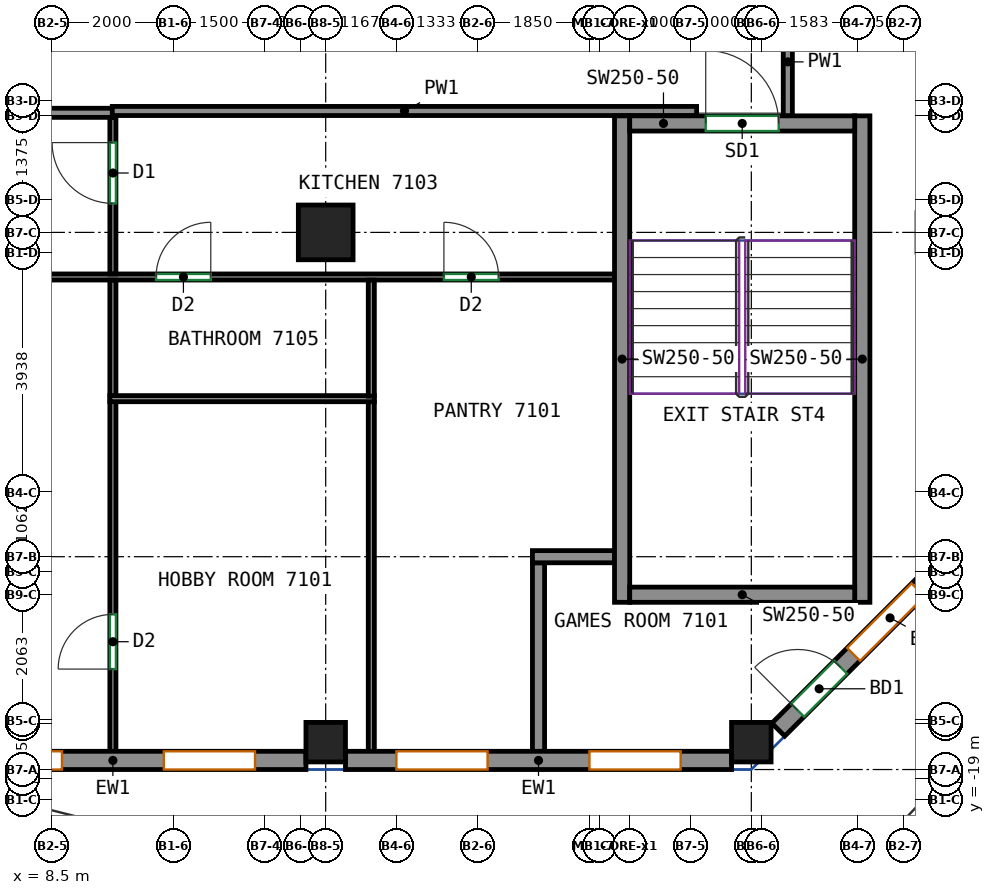
"""IFC4 building model, lengths in metres.
Left out: names, types, materials, properties, quantities, classifications, styles, units other than length and angle.
Written with IfcOpenShell. Run it as: python <this file> out.ifc"""

import sys

from ifc_helpers import new_model, si_unit, direction, frame, frame_2d, origin, origin_2d, place, context, subcontext, project, spatial, rectangle, extrude, source, transform, mapped, element, fill, save


model = new_model("IFC4")
c1 = context("Model", 3, precision=1e-05, world=origin(), true_north=direction((0.0, 1.0)))
c2 = subcontext(c1, "Body", "Model", "MODEL_VIEW")
j1 = project(units=[si_unit("LENGTHUNIT", "METRE"), si_unit("PLANEANGLEUNIT", "RADIAN")], contexts=[c1])
p1 = place(None, origin())
s1 = spatial("IfcSite", under=j1, at=p1, CompositionType="ELEMENT")
p2 = place(p1, origin())
s2 = spatial("IfcBuilding", under=s1, at=p2, CompositionType="ELEMENT")
p3 = place(p2, frame((0.0, 0.0, 287.4)))
s3 = spatial("IfcBuildingStorey", under=s2, at=p3, CompositionType="ELEMENT", Elevation=287.4)
m1 = source(origin(), c2, "Body", "SweptSolid", [
    extrude(rectangle(XDim=0.65, YDim=0.65, at=origin_2d()), origin(), (0.0, 0.0, 1.0), 3.0),
])
p4 = place(p3, frame((13.0, -18.05, 0.0), z_axis=(0.0, 0.0, 1.0), x_axis=(1.0, 0.0, 0.0)))
e1 = element("IfcColumn", 1, at=p4, inside=s3, PredefinedType="COLUMN", context=c2, shape_type="MappedRepresentation", body=[
    mapped(m1, transform((0.0, 0.0, 0.0))),
])
m2 = source(origin(), c2, "Body", "SweptSolid", [
    extrude(rectangle(XDim=0.9, YDim=0.9, at=origin_2d()), origin(), (0.0, 0.0, 1.0), 3.0),
])
p5 = place(p3, frame((13.0, -9.667, 0.0), z_axis=(0.0, 0.0, 1.0), x_axis=(1.0, 0.0, 0.0)))
e2 = element("IfcColumn", 2, at=p5, inside=s3, PredefinedType="COLUMN", context=c2, shape_type="MappedRepresentation", body=[
    mapped(m2, transform((0.0, 0.0, 0.0))),
])
p6 = place(p3, frame((20.0, -18.05, 0.0), z_axis=(0.0, 0.0, 1.0), x_axis=(1.0, 0.0, 0.0)))
e3 = element("IfcColumn", 3, at=p6, inside=s3, PredefinedType="COLUMN", context=c2, shape_type="MappedRepresentation", body=[
    mapped(m1, transform((0.0, 0.0, 0.0))),
])
m3 = source(origin(), c2, "Body", "SweptSolid", [
    extrude(rectangle(XDim=8.0, YDim=0.25, at=frame_2d((4.0, 0.0))), origin(), (0.0, 0.0, 1.0), 3.0),
])
for number, where, z_axis, x_axis in (
    (4, (17.875, -15.75, 0.0), (0.0, 0.0, 1.0), (0.0, 1.0, 0.0)),
    (5, (21.825, -15.75, 0.0), (0.0, 0.0, 1.0), (0.0, 1.0, 0.0)),
):
    element("IfcWall", number, at=place(p3, frame(where, z_axis=z_axis, x_axis=x_axis)), inside=s3, PredefinedType="SHEAR", context=c2, shape_type="MappedRepresentation", body=[
        mapped(m3, transform((0.0, 0.0, 0.0))),
    ])
m4 = source(origin(), c2, "Body", "SweptSolid", [
    extrude(rectangle(XDim=3.7, YDim=0.25, at=frame_2d((1.85, 0.0))), origin(), (0.0, 0.0, 1.0), 3.0),
])
p7 = place(p3, frame((18.0, -15.625, 0.0), z_axis=(0.0, 0.0, 1.0), x_axis=(1.0, 0.0, 0.0)))
e6 = element("IfcWall", 6, at=p7, inside=s3, PredefinedType="SHEAR", context=c2, shape_type="MappedRepresentation", body=[
    mapped(m4, transform((0.0, 0.0, 0.0))),
])
p8 = place(p3, frame((18.0, -7.875, 0.0), z_axis=(0.0, 0.0, 1.0), x_axis=(1.0, 0.0, 0.0)))
e7 = element("IfcWall", 7, at=p8, inside=s3, PredefinedType="SHEAR", context=c2, shape_type="MappedRepresentation", body=[
    mapped(m4, transform((0.0, 0.0, 0.0))),
])
p9 = place(p8, frame((1.25, 0.0, 0.0)))
e8 = element("IfcOpeningElement", 8, at=p9, cuts=e7, PredefinedType="OPENING", context=c2, shape_type="SweptSolid", body=[
    extrude(rectangle(XDim=1.2, YDim=2.1, at=frame_2d((0.6, 1.05))), frame((0.0, 0.135, 0.0), z_axis=(0.0, -1.0, 0.0), x_axis=(1.0, 0.0, 0.0)), (0.0, 0.0, 1.0), 0.27),
])
m5 = source(origin(), c2, "Body", "SweptSolid", [
    extrude(rectangle(XDim=6.35, YDim=0.3, at=frame_2d((3.175, 0.0))), origin(), (0.0, 0.0, 1.0), 3.0),
])
p10 = place(p3, frame((6.325, -18.35, 0.0), z_axis=(0.0, 0.0, 1.0), x_axis=(1.0, 0.0, 0.0)))
e9 = element("IfcWall", 9, at=p10, inside=s3, PredefinedType="SOLIDWALL", context=c2, shape_type="MappedRepresentation", body=[
    mapped(m5, transform((0.0, 0.0, 0.0))),
])
p11 = place(p10, frame((0.837, 0.0, 0.8)))
e10 = element("IfcOpeningElement", 10, at=p11, cuts=e9, PredefinedType="OPENING", context=c2, shape_type="SweptSolid", body=[
    extrude(rectangle(XDim=1.5, YDim=2.05, at=frame_2d((0.75, 1.025))), frame((0.0, 0.16, 0.0), z_axis=(0.0, -1.0, 0.0), x_axis=(1.0, 0.0, 0.0)), (0.0, 0.0, 1.0), 0.32),
])
p12 = place(p10, frame((4.012, 0.0, 0.8)))
e11 = element("IfcOpeningElement", 11, at=p12, cuts=e9, PredefinedType="OPENING", context=c2, shape_type="SweptSolid", body=[
    extrude(rectangle(XDim=1.5, YDim=2.05, at=frame_2d((0.75, 1.025))), frame((0.0, 0.16, 0.0), z_axis=(0.0, -1.0, 0.0), x_axis=(1.0, 0.0, 0.0)), (0.0, 0.0, 1.0), 0.32),
])
p13 = place(p3, frame((13.325, -18.35, 0.0), z_axis=(0.0, 0.0, 1.0), x_axis=(1.0, 0.0, 0.0)))
e12 = element("IfcWall", 12, at=p13, inside=s3, PredefinedType="SOLIDWALL", context=c2, shape_type="MappedRepresentation", body=[
    mapped(m5, transform((0.0, 0.0, 0.0))),
])
p14 = place(p13, frame((0.837, 0.0, 0.8)))
e13 = element("IfcOpeningElement", 13, at=p14, cuts=e12, PredefinedType="OPENING", context=c2, shape_type="SweptSolid", body=[
    extrude(rectangle(XDim=1.5, YDim=2.05, at=frame_2d((0.75, 1.025))), frame((0.0, 0.16, 0.0), z_axis=(0.0, -1.0, 0.0), x_axis=(1.0, 0.0, 0.0)), (0.0, 0.0, 1.0), 0.32),
])
p15 = place(p13, frame((4.012, 0.0, 0.8)))
e14 = element("IfcOpeningElement", 14, at=p15, cuts=e12, PredefinedType="OPENING", context=c2, shape_type="SweptSolid", body=[
    extrude(rectangle(XDim=1.5, YDim=2.05, at=frame_2d((0.75, 1.025))), frame((0.0, 0.16, 0.0), z_axis=(0.0, -1.0, 0.0), x_axis=(1.0, 0.0, 0.0)), (0.0, 0.0, 1.0), 0.32),
])
m6 = source(origin(), c2, "Body", "SweptSolid", [
    extrude(rectangle(XDim=3.712, YDim=0.3, at=frame_2d((1.856, 0.0))), origin(), (0.0, 0.0, 1.0), 3.0),
])
p16 = place(p3, frame((20.444, -17.844, 0.0), z_axis=(0.0, 0.0, 1.0), x_axis=(0.707106781187, 0.707106781187, 0.0)))
e15 = element("IfcWall", 15, at=p16, inside=s3, PredefinedType="SOLIDWALL", context=c2, shape_type="MappedRepresentation", body=[
    mapped(m6, transform((0.0, 0.0, 0.0))),
])
p17 = place(p16, frame((1.75, 0.0, 0.8)))
e16 = element("IfcOpeningElement", 16, at=p17, cuts=e15, PredefinedType="OPENING", context=c2, shape_type="SweptSolid", body=[
    extrude(rectangle(XDim=1.5, YDim=2.05, at=frame_2d((0.75, 1.025))), frame((0.0, 0.16, 0.0), z_axis=(0.0, -1.0, 0.0), x_axis=(1.0, 0.0, 0.0)), (0.0, 0.0, 1.0), 0.32),
])
p18 = place(p16, frame((0.45, 0.0, 0.0)))
e17 = element("IfcOpeningElement", 17, at=p18, cuts=e15, PredefinedType="OPENING", context=c2, shape_type="SweptSolid", body=[
    extrude(rectangle(XDim=1.0, YDim=2.1, at=frame_2d((0.5, 1.05))), frame((0.0, 0.16, 0.0), z_axis=(0.0, -1.0, 0.0), x_axis=(1.0, 0.0, 0.0)), (0.0, 0.0, 1.0), 0.32),
])
p19 = place(p3, frame((-11.51, -7.7, 0.0), z_axis=(0.0, 0.0, 1.0), x_axis=(1.0, 0.0, 0.0)))
e18 = element("IfcWall", 18, at=p19, inside=s3, PredefinedType="PARTITIONING", context=c2, shape_type="SweptSolid", body=[
    extrude(rectangle(XDim=21.02, YDim=0.15, at=frame_2d((10.51, 0.0))), origin(), (0.0, 0.0, 1.0), 3.0),
])
p20 = place(p19, frame((1.728, 0.0, 0.0)))
e19 = element("IfcOpeningElement", 19, at=p20, cuts=e18, PredefinedType="OPENING", context=c2, shape_type="SweptSolid", body=[
    extrude(rectangle(XDim=1.0, YDim=2.1, at=frame_2d((0.5, 1.05))), frame((0.0, 0.085, 0.0), z_axis=(0.0, -1.0, 0.0), x_axis=(1.0, 0.0, 0.0)), (0.0, 0.0, 1.0), 0.17),
])
p21 = place(p19, frame((12.604, 0.0, 0.0)))
e20 = element("IfcOpeningElement", 20, at=p21, cuts=e18, PredefinedType="OPENING", context=c2, shape_type="SweptSolid", body=[
    extrude(rectangle(XDim=1.0, YDim=2.1, at=frame_2d((0.5, 1.05))), frame((0.0, 0.085, 0.0), z_axis=(0.0, -1.0, 0.0), x_axis=(1.0, 0.0, 0.0)), (0.0, 0.0, 1.0), 0.17),
])
p22 = place(p3, frame((9.49, -7.67, 0.0), z_axis=(0.0, 0.0, 1.0), x_axis=(1.0, 0.0, 0.0)))
e21 = element("IfcWall", 21, at=p22, inside=s3, PredefinedType="PARTITIONING", context=c2, shape_type="SweptSolid", body=[
    extrude(rectangle(XDim=9.61, YDim=0.15, at=frame_2d((4.805, 0.0))), origin(), (0.0, 0.0, 1.0), 3.0),
])
p23 = place(p3, frame((20.6, -7.75, 0.0), z_axis=(0.0, 0.0, 1.0), x_axis=(0.0, 1.0, 0.0)))
e22 = element("IfcWall", 22, at=p23, inside=s3, PredefinedType="PARTITIONING", context=c2, shape_type="SweptSolid", body=[
    extrude(rectangle(XDim=1.775, YDim=0.15, at=frame_2d((0.887, 0.0))), origin(), (0.0, 0.0, 1.0), 3.0),
])
p24 = place(p3, frame((-11.5, -10.4, 0.0), z_axis=(0.0, 0.0, 1.0), x_axis=(1.0, 0.0, 0.0)))
e23 = element("IfcWall", 23, at=p24, inside=s3, PredefinedType="PARTITIONING", context=c2, shape_type="SweptSolid", body=[
    extrude(rectangle(XDim=29.25, YDim=0.1, at=frame_2d((14.625, 0.0))), origin(), (0.0, 0.0, 1.0), 3.0),
])
p25 = place(p24, frame((2.024, 0.0, 0.0)))
e24 = element("IfcOpeningElement", 24, at=p25, cuts=e23, PredefinedType="OPENING", context=c2, shape_type="SweptSolid", body=[
    extrude(rectangle(XDim=1.0, YDim=2.1, at=frame_2d((0.5, 1.05))), frame((0.0, 0.06, 0.0), z_axis=(0.0, -1.0, 0.0), x_axis=(1.0, 0.0, 0.0)), (0.0, 0.0, 1.0), 0.12),
])
p26 = place(p24, frame((7.391, 0.0, 0.0)))
e25 = element("IfcOpeningElement", 25, at=p26, cuts=e23, PredefinedType="OPENING", context=c2, shape_type="SweptSolid", body=[
    extrude(rectangle(XDim=0.9, YDim=2.1, at=frame_2d((0.45, 1.05))), frame((0.0, 0.06, 0.0), z_axis=(0.0, -1.0, 0.0), x_axis=(1.0, 0.0, 0.0)), (0.0, 0.0, 1.0), 0.12),
])
p27 = place(p24, frame((15.5, 0.0, 0.0)))
e26 = element("IfcOpeningElement", 26, at=p27, cuts=e23, PredefinedType="OPENING", context=c2, shape_type="SweptSolid", body=[
    extrude(rectangle(XDim=1.0, YDim=2.1, at=frame_2d((0.5, 1.05))), frame((0.0, 0.06, 0.0), z_axis=(0.0, -1.0, 0.0), x_axis=(1.0, 0.0, 0.0)), (0.0, 0.0, 1.0), 0.12),
])
p28 = place(p24, frame((21.71, 0.0, 0.0)))
e27 = element("IfcOpeningElement", 27, at=p28, cuts=e23, PredefinedType="OPENING", context=c2, shape_type="SweptSolid", body=[
    extrude(rectangle(XDim=0.9, YDim=2.1, at=frame_2d((0.45, 1.05))), frame((0.0, 0.06, 0.0), z_axis=(0.0, -1.0, 0.0), x_axis=(1.0, 0.0, 0.0)), (0.0, 0.0, 1.0), 0.12),
])
p29 = place(p24, frame((26.444, 0.0, 0.0)))
e28 = element("IfcOpeningElement", 28, at=p29, cuts=e23, PredefinedType="OPENING", context=c2, shape_type="SweptSolid", body=[
    extrude(rectangle(XDim=0.9, YDim=2.1, at=frame_2d((0.45, 1.05))), frame((0.0, 0.06, 0.0), z_axis=(0.0, -1.0, 0.0), x_axis=(1.0, 0.0, 0.0)), (0.0, 0.0, 1.0), 0.12),
])
p30 = place(p3, frame((9.5, -10.35, 0.0), z_axis=(0.0, 0.0, 1.0), x_axis=(0.0, 1.0, 0.0)))
e29 = element("IfcWall", 29, at=p30, inside=s3, PredefinedType="PARTITIONING", context=c2, shape_type="SweptSolid", body=[
    extrude(rectangle(XDim=2.573, YDim=0.1, at=frame_2d((1.287, 0.0))), origin(), (0.0, 0.0, 1.0), 3.0),
])
p31 = place(p30, frame((1.16, 0.0, 0.0)))
e30 = element("IfcOpeningElement", 30, at=p31, cuts=e29, PredefinedType="OPENING", context=c2, shape_type="SweptSolid", body=[
    extrude(rectangle(XDim=1.0, YDim=2.1, at=frame_2d((0.5, 1.05))), frame((0.0, 0.06, 0.0), z_axis=(0.0, -1.0, 0.0), x_axis=(1.0, 0.0, 0.0)), (0.0, 0.0, 1.0), 0.12),
])
p32 = place(p3, frame((9.5, -18.25, 0.0), z_axis=(0.0, 0.0, 1.0), x_axis=(0.0, 1.0, 0.0)))
e31 = element("IfcWall", 31, at=p32, inside=s3, PredefinedType="PARTITIONING", context=c2, shape_type="SweptSolid", body=[
    extrude(rectangle(XDim=5.809, YDim=0.1, at=frame_2d((2.905, 0.0))), origin(), (0.0, 0.0, 1.0), 3.0),
])
p33 = place(p32, frame((1.402, 0.0, 0.0)))
e32 = element("IfcOpeningElement", 32, at=p33, cuts=e31, PredefinedType="OPENING", context=c2, shape_type="SweptSolid", body=[
    extrude(rectangle(XDim=0.9, YDim=2.1, at=frame_2d((0.45, 1.05))), frame((0.0, 0.06, 0.0), z_axis=(0.0, -1.0, 0.0), x_axis=(1.0, 0.0, 0.0)), (0.0, 0.0, 1.0), 0.12),
])
p34 = place(p3, frame((9.5, -12.36, 0.0), z_axis=(0.0, 0.0, 1.0), x_axis=(0.0, 1.0, 0.0)))
e33 = element("IfcWall", 33, at=p34, inside=s3, PredefinedType="PARTITIONING", context=c2, shape_type="SweptSolid", body=[
    extrude(rectangle(XDim=1.908, YDim=0.1, at=frame_2d((0.954, 0.0))), origin(), (0.0, 0.0, 1.0), 3.0),
])
p35 = place(p3, frame((13.75, -18.25, 0.0), z_axis=(0.0, 0.0, 1.0), x_axis=(0.0, 1.0, 0.0)))
e34 = element("IfcWall", 34, at=p35, inside=s3, PredefinedType="PARTITIONING", context=c2, shape_type="SweptSolid", body=[
    extrude(rectangle(XDim=5.799, YDim=0.1, at=frame_2d((2.899, 0.0))), origin(), (0.0, 0.0, 1.0), 3.0),
])
p36 = place(p3, frame((13.8, -12.401, 0.0), z_axis=(0.0, 0.0, 1.0), x_axis=(-1.0, 0.0, 0.0)))
e35 = element("IfcWall", 35, at=p36, inside=s3, PredefinedType="PARTITIONING", context=c2, shape_type="SweptSolid", body=[
    extrude(rectangle(XDim=4.35, YDim=0.1, at=frame_2d((2.175, 0.0))), origin(), (0.0, 0.0, 1.0), 3.0),
])
p37 = place(p3, frame((16.5, -18.25, 0.0), z_axis=(0.0, 0.0, 1.0), x_axis=(0.0, 1.0, 0.0)))
e36 = element("IfcWall", 36, at=p37, inside=s3, PredefinedType="PARTITIONING", context=c2, shape_type="SweptSolid", body=[
    extrude(rectangle(XDim=3.15, YDim=0.2, at=frame_2d((1.575, 0.0))), origin(), (0.0, 0.0, 1.0), 3.0),
])
p38 = place(p3, frame((16.4, -15.0, 0.0), z_axis=(0.0, 0.0, 1.0), x_axis=(1.0, 0.0, 0.0)))
e37 = element("IfcWall", 37, at=p38, inside=s3, PredefinedType="PARTITIONING", context=c2, shape_type="SweptSolid", body=[
    extrude(rectangle(XDim=1.35, YDim=0.2, at=frame_2d((0.675, 0.0))), origin(), (0.0, 0.0, 1.0), 3.0),
])
p39 = place(p3, frame((13.75, -12.36, 0.0), z_axis=(0.0, 0.0, 1.0), x_axis=(0.0, 1.0, 0.0)))
e38 = element("IfcWall", 38, at=p39, inside=s3, PredefinedType="PARTITIONING", context=c2, shape_type="SweptSolid", body=[
    extrude(rectangle(XDim=1.908, YDim=0.1, at=frame_2d((0.954, 0.0))), origin(), (0.0, 0.0, 1.0), 3.0),
])
p40 = place(p11, origin())
e39 = element("IfcWindow", 39, at=p40, inside=s3, PartitioningType="SINGLE_PANEL", PredefinedType="WINDOW", context=c2, shape_type="SweptSolid", body=[
    extrude(rectangle(XDim=1.5, YDim=2.05, at=frame_2d((0.75, 1.025))), frame((0.0, 0.03, 0.0), z_axis=(0.0, -1.0, 0.0), x_axis=(1.0, 0.0, 0.0)), (0.0, 0.0, 1.0), 0.06),
])
fill(e10, e39)
p41 = place(p12, origin())
e40 = element("IfcWindow", 40, at=p41, inside=s3, PartitioningType="SINGLE_PANEL", PredefinedType="WINDOW", context=c2, shape_type="SweptSolid", body=[
    extrude(rectangle(XDim=1.5, YDim=2.05, at=frame_2d((0.75, 1.025))), frame((0.0, 0.03, 0.0), z_axis=(0.0, -1.0, 0.0), x_axis=(1.0, 0.0, 0.0)), (0.0, 0.0, 1.0), 0.06),
])
fill(e11, e40)
p42 = place(p14, origin())
e41 = element("IfcWindow", 41, at=p42, inside=s3, PartitioningType="SINGLE_PANEL", PredefinedType="WINDOW", context=c2, shape_type="SweptSolid", body=[
    extrude(rectangle(XDim=1.5, YDim=2.05, at=frame_2d((0.75, 1.025))), frame((0.0, 0.03, 0.0), z_axis=(0.0, -1.0, 0.0), x_axis=(1.0, 0.0, 0.0)), (0.0, 0.0, 1.0), 0.06),
])
fill(e13, e41)
p43 = place(p15, origin())
e42 = element("IfcWindow", 42, at=p43, inside=s3, PartitioningType="SINGLE_PANEL", PredefinedType="WINDOW", context=c2, shape_type="SweptSolid", body=[
    extrude(rectangle(XDim=1.5, YDim=2.05, at=frame_2d((0.75, 1.025))), frame((0.0, 0.03, 0.0), z_axis=(0.0, -1.0, 0.0), x_axis=(1.0, 0.0, 0.0)), (0.0, 0.0, 1.0), 0.06),
])
fill(e14, e42)
p44 = place(p17, origin())
e43 = element("IfcWindow", 43, at=p44, inside=s3, PartitioningType="SINGLE_PANEL", PredefinedType="WINDOW", context=c2, shape_type="SweptSolid", body=[
    extrude(rectangle(XDim=1.5, YDim=2.05, at=frame_2d((0.75, 1.025))), frame((0.0, 0.03, 0.0), z_axis=(0.0, -1.0, 0.0), x_axis=(1.0, 0.0, 0.0)), (0.0, 0.0, 1.0), 0.06),
])
fill(e16, e43)
p45 = place(p18, origin())
e44 = element("IfcDoor", 44, at=p45, inside=s3, OperationType="SINGLE_SWING_LEFT", PredefinedType="DOOR", context=c2, shape_type="SweptSolid", body=[
    extrude(rectangle(XDim=1.0, YDim=2.1, at=frame_2d((0.5, 1.05))), frame((0.0, 0.025, 0.0), z_axis=(0.0, -1.0, 0.0), x_axis=(1.0, 0.0, 0.0)), (0.0, 0.0, 1.0), 0.05),
])
fill(e17, e44)
p46 = place(p9, origin())
e45 = element("IfcDoor", 45, at=p46, inside=s3, OperationType="DOUBLE_DOOR_SINGLE_SWING", PredefinedType="DOOR", context=c2, shape_type="SweptSolid", body=[
    extrude(rectangle(XDim=1.2, YDim=2.1, at=frame_2d((0.6, 1.05))), frame((0.0, 0.025, 0.0), z_axis=(0.0, -1.0, 0.0), x_axis=(1.0, 0.0, 0.0)), (0.0, 0.0, 1.0), 0.05),
])
fill(e8, e45)
p47 = place(p33, origin())
e46 = element("IfcDoor", 46, at=p47, inside=s3, OperationType="SINGLE_SWING_LEFT", PredefinedType="DOOR", context=c2, shape_type="SweptSolid", body=[
    extrude(rectangle(XDim=0.9, YDim=2.1, at=frame_2d((0.45, 1.05))), frame((0.0, 0.025, 0.0), z_axis=(0.0, -1.0, 0.0), x_axis=(1.0, 0.0, 0.0)), (0.0, 0.0, 1.0), 0.05),
])
fill(e32, e46)
p48 = place(p28, origin())
e47 = element("IfcDoor", 47, at=p48, inside=s3, OperationType="SINGLE_SWING_RIGHT", PredefinedType="DOOR", context=c2, shape_type="SweptSolid", body=[
    extrude(rectangle(XDim=0.9, YDim=2.1, at=frame_2d((0.45, 1.05))), frame((0.0, 0.025, 0.0), z_axis=(0.0, -1.0, 0.0), x_axis=(1.0, 0.0, 0.0)), (0.0, 0.0, 1.0), 0.05),
])
fill(e27, e47)
p49 = place(p29, origin())
e48 = element("IfcDoor", 48, at=p49, inside=s3, OperationType="SINGLE_SWING_LEFT", PredefinedType="DOOR", context=c2, shape_type="SweptSolid", body=[
    extrude(rectangle(XDim=0.9, YDim=2.1, at=frame_2d((0.45, 1.05))), frame((0.0, 0.025, 0.0), z_axis=(0.0, -1.0, 0.0), x_axis=(1.0, 0.0, 0.0)), (0.0, 0.0, 1.0), 0.05),
])
fill(e28, e48)
p50 = place(p31, origin())
e49 = element("IfcDoor", 49, at=p50, inside=s3, OperationType="SINGLE_SWING_RIGHT", PredefinedType="DOOR", context=c2, shape_type="SweptSolid", body=[
    extrude(rectangle(XDim=1.0, YDim=2.1, at=frame_2d((0.5, 1.05))), frame((0.0, 0.025, 0.0), z_axis=(0.0, -1.0, 0.0), x_axis=(1.0, 0.0, 0.0)), (0.0, 0.0, 1.0), 0.05),
])
fill(e30, e49)
save(model, sys.argv[1])
